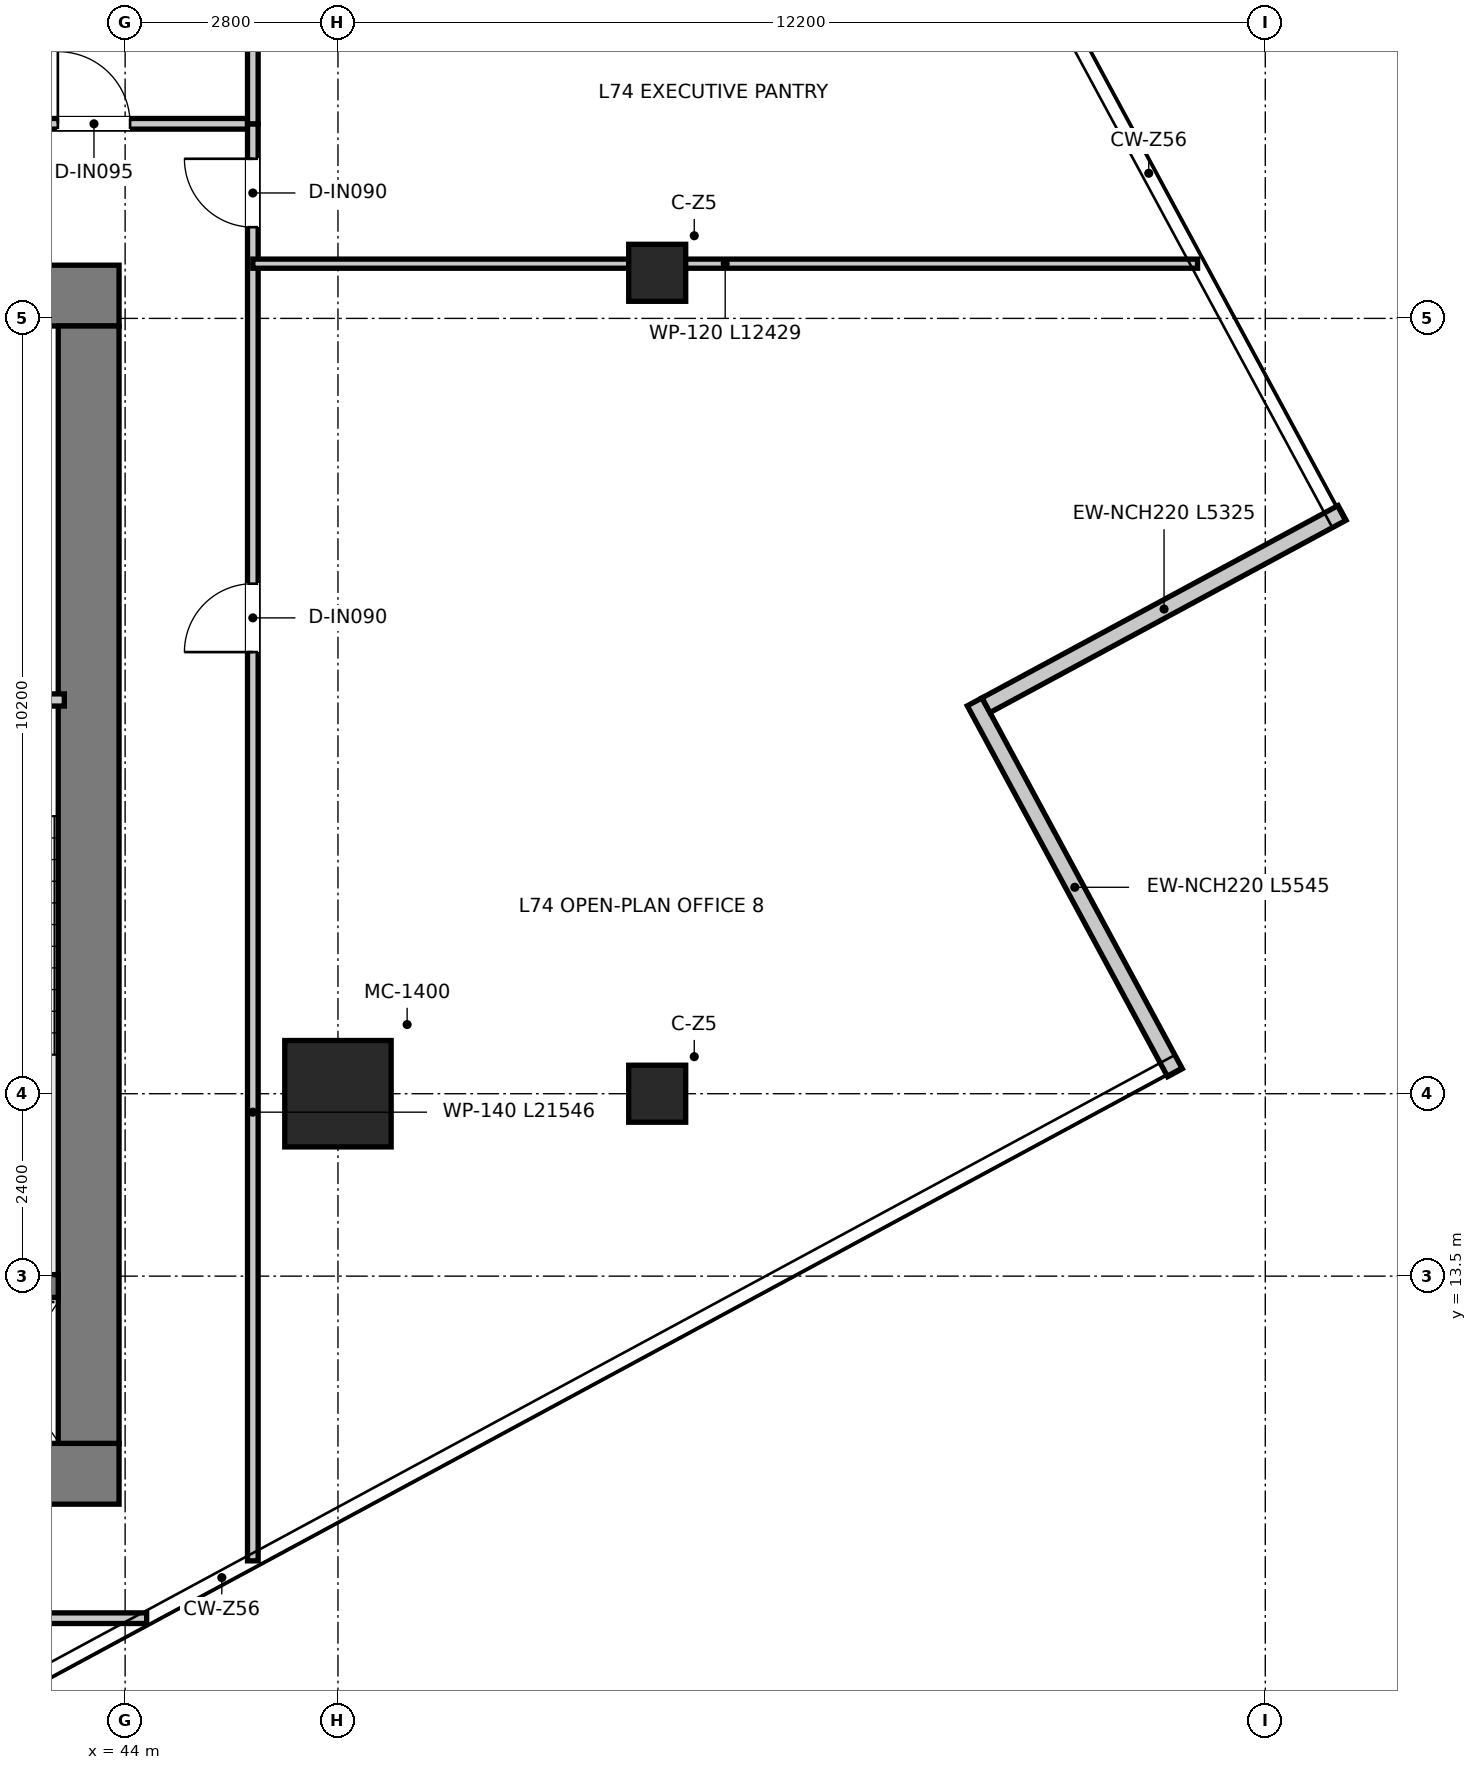
"""IFC4 building model, lengths in metres.
Left out: names, types, materials, properties, quantities, classifications, styles, units other than length and angle.
Written with IfcOpenShell. Run it as: python <this file> out.ifc"""

import sys

from ifc_helpers import new_model, si_unit, direction, frame, frame_2d, origin, origin_2d, place, context, subcontext, project, spatial, rectangle, extrude, source, transform, mapped, element, fill, save


model = new_model("IFC4")
c1 = context("Model", 3, precision=1e-05, world=origin(), true_north=direction((0.0, 1.0)))
c2 = subcontext(c1, "Body", "Model", "MODEL_VIEW")
j1 = project(units=[si_unit("LENGTHUNIT", "METRE"), si_unit("PLANEANGLEUNIT", "RADIAN")], contexts=[c1])
p1 = place(None, origin())
s1 = spatial("IfcSite", under=j1, at=p1, CompositionType="ELEMENT")
p2 = place(p1, origin())
s2 = spatial("IfcBuilding", under=s1, at=p2, CompositionType="ELEMENT")
p3 = place(p2, frame((0.0, 0.0, 302.95)))
s3 = spatial("IfcBuildingStorey", under=s2, at=p3, CompositionType="ELEMENT", Elevation=302.95)
p4 = place(p3, frame((28.08, 10.9, 0.0), z_axis=(0.0, 0.0, 1.0), x_axis=(1.0, 0.0, 0.0)))
e1 = element("IfcWall", 1, at=p4, inside=s3, PredefinedType="SHEAR", context=c2, shape_type="SweptSolid", body=[
    extrude(rectangle(XDim=15.84, YDim=0.8, at=frame_2d((7.92, 0.0))), origin(), (0.0, 0.0, 1.0), 3.95),
])
p5 = place(p3, frame((28.08, 26.4, 0.0), z_axis=(0.0, 0.0, 1.0), x_axis=(1.0, 0.0, 0.0)))
e2 = element("IfcWall", 2, at=p5, inside=s3, PredefinedType="SHEAR", context=c2, shape_type="SweptSolid", body=[
    extrude(rectangle(XDim=15.84, YDim=0.8, at=frame_2d((7.92, 0.0))), origin(), (0.0, 0.0, 1.0), 3.95),
])
p6 = place(p5, frame((7.22, 0.0, 0.0)))
e3 = element("IfcOpeningElement", 3, at=p6, cuts=e2, PredefinedType="OPENING", context=c2, shape_type="SweptSolid", body=[
    extrude(rectangle(XDim=1.4, YDim=2.2, at=frame_2d((0.7, 1.1))), frame((0.0, 0.41, 0.0), z_axis=(0.0, -1.0, 0.0), x_axis=(1.0, 0.0, 0.0)), (0.0, 0.0, 1.0), 0.82),
])
p7 = place(p5, frame((1.775, 0.0, 0.0)))
e4 = element("IfcOpeningElement", 4, at=p7, cuts=e2, PredefinedType="OPENING", context=c2, shape_type="SweptSolid", body=[
    extrude(rectangle(XDim=1.05, YDim=2.1, at=frame_2d((0.525, 1.05))), frame((0.0, 0.41, 0.0), z_axis=(0.0, -1.0, 0.0), x_axis=(1.0, 0.0, 0.0)), (0.0, 0.0, 1.0), 0.82),
])
p8 = place(p5, frame((13.015, 0.0, 0.0)))
e5 = element("IfcOpeningElement", 5, at=p8, cuts=e2, PredefinedType="OPENING", context=c2, shape_type="SweptSolid", body=[
    extrude(rectangle(XDim=1.05, YDim=2.1, at=frame_2d((0.525, 1.05))), frame((0.0, 0.41, 0.0), z_axis=(0.0, -1.0, 0.0), x_axis=(1.0, 0.0, 0.0)), (0.0, 0.0, 1.0), 0.82),
])
p9 = place(p3, frame((43.52, 11.3, 0.0), z_axis=(0.0, 0.0, 1.0), x_axis=(0.0, 1.0, 0.0)))
e6 = element("IfcWall", 6, at=p9, inside=s3, PredefinedType="SHEAR", context=c2, shape_type="SweptSolid", body=[
    extrude(rectangle(XDim=14.7, YDim=0.8, at=frame_2d((7.35, 0.0))), origin(), (0.0, 0.0, 1.0), 3.95),
])
p10 = place(p3, frame((40.02, 13.37, 0.0), z_axis=(0.0, 0.0, 1.0), x_axis=(1.0, 0.0, 0.0)))
e7 = element("IfcWall", 7, at=p10, inside=s3, PredefinedType="SHEAR", context=c2, shape_type="SweptSolid", body=[
    extrude(rectangle(XDim=3.1, YDim=0.3, at=frame_2d((1.55, 0.0))), origin(), (0.0, 0.0, 1.0), 3.95),
])
m1 = source(origin(), c2, "Body", "SweptSolid", [
    extrude(rectangle(XDim=1.4, YDim=1.4, at=origin_2d()), origin(), (0.0, 0.0, 1.0), 3.95),
])
p11 = place(p3, frame((46.8, 15.9, 0.0), z_axis=(0.0, 0.0, 1.0), x_axis=(1.0, 0.0, 0.0)))
e8 = element("IfcColumn", 8, at=p11, inside=s3, PredefinedType="USERDEFINED", context=c2, shape_type="MappedRepresentation", body=[
    mapped(m1, transform((0.0, 0.0, 0.0), x_axis=(1.0, 0.0, 0.0), y_axis=(0.0, 1.0, 0.0), z_axis=(0.0, 0.0, 1.0), scale=1.0)),
])
m2 = source(origin(), c2, "Body", "SweptSolid", [
    extrude(rectangle(XDim=0.75, YDim=0.75, at=origin_2d()), origin(), (0.0, 0.0, 1.0), 3.95),
])
for number, where, z_axis, x_axis in (
    (9, (51.0, 26.7, 0.0), (0.0, 0.0, 1.0), (1.0, 0.0, 0.0)),
    (10, (51.0, 15.9, 0.0), (0.0, 0.0, 1.0), (1.0, 0.0, 0.0)),
):
    element("IfcColumn", number, at=place(p3, frame(where, z_axis=z_axis, x_axis=x_axis)), inside=s3, PredefinedType="COLUMN", context=c2, shape_type="MappedRepresentation", body=[
        mapped(m2, transform((0.0, 0.0, 0.0), x_axis=(1.0, 0.0, 0.0), y_axis=(0.0, 1.0, 0.0), z_axis=(0.0, 0.0, 1.0), scale=1.0)),
    ])
p12 = place(p3, frame((57.812, 16.177, 0.0), z_axis=(0.0, 0.0, 1.0), x_axis=(-0.475257315172, 0.879846852796, 0.0)))
e11 = element("IfcWall", 11, at=p12, inside=s3, PredefinedType="ELEMENTEDWALL", context=c2, shape_type="SweptSolid", body=[
    extrude(rectangle(XDim=5.545, YDim=0.22, at=frame_2d((2.772, 0.0))), origin(), (0.0, 0.0, 1.0), 3.67),
])
p13 = place(p3, frame((55.326, 21.011, 0.0), z_axis=(0.0, 0.0, 1.0), x_axis=(0.879840215515, 0.475269602607, 0.0)))
e12 = element("IfcWall", 12, at=p13, inside=s3, PredefinedType="ELEMENTEDWALL", context=c2, shape_type="SweptSolid", body=[
    extrude(rectangle(XDim=5.325, YDim=0.22, at=frame_2d((2.663, 0.0))), origin(), (0.0, 0.0, 1.0), 3.67),
])
p14 = place(p3, frame((40.04, 21.08, 0.0), z_axis=(0.0, 0.0, 1.0), x_axis=(1.0, 0.0, 0.0)))
e13 = element("IfcWall", 13, at=p14, inside=s3, PredefinedType="PARTITIONING", context=c2, shape_type="SweptSolid", body=[
    extrude(rectangle(XDim=3.16, YDim=0.16, at=frame_2d((1.58, 0.0))), origin(), (0.0, 0.0, 1.0), 3.67),
])
p15 = place(p14, frame((1.055, 0.0, 0.0)))
e14 = element("IfcOpeningElement", 14, at=p15, cuts=e13, PredefinedType="OPENING", context=c2, shape_type="SweptSolid", body=[
    extrude(rectangle(XDim=1.05, YDim=2.1, at=frame_2d((0.525, 1.05))), frame((0.0, 0.09, 0.0), z_axis=(0.0, -1.0, 0.0), x_axis=(1.0, 0.0, 0.0)), (0.0, 0.0, 1.0), 0.18),
])
p16 = place(p3, frame((26.32, 28.66, 0.0), z_axis=(0.0, 0.0, 1.0), x_axis=(1.0, 0.0, 0.0)))
e15 = element("IfcWall", 15, at=p16, inside=s3, PredefinedType="PARTITIONING", context=c2, shape_type="SweptSolid", body=[
    extrude(rectangle(XDim=19.36, YDim=0.14, at=frame_2d((9.68, 0.0))), origin(), (0.0, 0.0, 1.0), 3.18),
])
p17 = place(p16, frame((1.615, 0.0, 0.0)))
e16 = element("IfcOpeningElement", 16, at=p17, cuts=e15, PredefinedType="OPENING", context=c2, shape_type="SweptSolid", body=[
    extrude(rectangle(XDim=0.95, YDim=2.1, at=frame_2d((0.475, 1.05))), frame((0.0, 0.08, 0.0), z_axis=(0.0, -1.0, 0.0), x_axis=(1.0, 0.0, 0.0)), (0.0, 0.0, 1.0), 0.16),
])
p18 = place(p16, frame((6.455, 0.0, 0.0)))
e17 = element("IfcOpeningElement", 17, at=p18, cuts=e15, PredefinedType="OPENING", context=c2, shape_type="SweptSolid", body=[
    extrude(rectangle(XDim=0.95, YDim=2.1, at=frame_2d((0.475, 1.05))), frame((0.0, 0.08, 0.0), z_axis=(0.0, -1.0, 0.0), x_axis=(1.0, 0.0, 0.0)), (0.0, 0.0, 1.0), 0.16),
])
p19 = place(p16, frame((11.955, 0.0, 0.0)))
e18 = element("IfcOpeningElement", 18, at=p19, cuts=e15, PredefinedType="OPENING", context=c2, shape_type="SweptSolid", body=[
    extrude(rectangle(XDim=0.95, YDim=2.1, at=frame_2d((0.475, 1.05))), frame((0.0, 0.08, 0.0), z_axis=(0.0, -1.0, 0.0), x_axis=(1.0, 0.0, 0.0)), (0.0, 0.0, 1.0), 0.16),
])
p20 = place(p16, frame((16.795, 0.0, 0.0)))
e19 = element("IfcOpeningElement", 19, at=p20, cuts=e15, PredefinedType="OPENING", context=c2, shape_type="SweptSolid", body=[
    extrude(rectangle(XDim=0.95, YDim=2.1, at=frame_2d((0.475, 1.05))), frame((0.0, 0.08, 0.0), z_axis=(0.0, -1.0, 0.0), x_axis=(1.0, 0.0, 0.0)), (0.0, 0.0, 1.0), 0.16),
])
p21 = place(p3, frame((45.68, 9.754, 0.0), z_axis=(0.0, 0.0, 1.0), x_axis=(0.0, 1.0, 0.0)))
e20 = element("IfcWall", 20, at=p21, inside=s3, PredefinedType="PARTITIONING", context=c2, shape_type="SweptSolid", body=[
    extrude(rectangle(XDim=18.906, YDim=0.14, at=frame_2d((9.453, 0.0))), origin(), (0.0, 0.0, 1.0), 3.13),
])
p22 = place(p21, frame((17.546, 0.0, 0.0)))
e21 = element("IfcOpeningElement", 21, at=p22, cuts=e20, PredefinedType="OPENING", context=c2, shape_type="SweptSolid", body=[
    extrude(rectangle(XDim=0.9, YDim=2.1, at=frame_2d((0.45, 1.05))), frame((0.0, 0.08, 0.0), z_axis=(0.0, -1.0, 0.0), x_axis=(1.0, 0.0, 0.0)), (0.0, 0.0, 1.0), 0.16),
])
p23 = place(p21, frame((11.956, 0.0, 0.0)))
e22 = element("IfcOpeningElement", 22, at=p23, cuts=e20, PredefinedType="OPENING", context=c2, shape_type="SweptSolid", body=[
    extrude(rectangle(XDim=0.9, YDim=2.1, at=frame_2d((0.45, 1.05))), frame((0.0, 0.08, 0.0), z_axis=(0.0, -1.0, 0.0), x_axis=(1.0, 0.0, 0.0)), (0.0, 0.0, 1.0), 0.16),
])
p24 = place(p3, frame((23.386, 9.0, 0.0), z_axis=(0.0, 0.0, 1.0), x_axis=(1.0, 0.0, 0.0)))
e23 = element("IfcWall", 23, at=p24, inside=s3, PredefinedType="PARTITIONING", context=c2, shape_type="SweptSolid", body=[
    extrude(rectangle(XDim=20.897, YDim=0.14, at=frame_2d((10.448, 0.0))), origin(), (0.0, 0.0, 1.0), 3.67),
])
p25 = place(p24, frame((8.189, 0.0, 0.0)))
e24 = element("IfcOpeningElement", 24, at=p25, cuts=e23, PredefinedType="OPENING", context=c2, shape_type="SweptSolid", body=[
    extrude(rectangle(XDim=0.85, YDim=2.1, at=frame_2d((0.425, 1.05))), frame((0.0, 0.08, 0.0), z_axis=(0.0, -1.0, 0.0), x_axis=(1.0, 0.0, 0.0)), (0.0, 0.0, 1.0), 0.16),
])
p26 = place(p24, frame((16.189, 0.0, 0.0)))
e25 = element("IfcOpeningElement", 25, at=p26, cuts=e23, PredefinedType="OPENING", context=c2, shape_type="SweptSolid", body=[
    extrude(rectangle(XDim=0.85, YDim=2.1, at=frame_2d((0.425, 1.05))), frame((0.0, 0.08, 0.0), z_axis=(0.0, -1.0, 0.0), x_axis=(1.0, 0.0, 0.0)), (0.0, 0.0, 1.0), 0.16),
])
p27 = place(p3, frame((45.68, 26.82, 0.0), z_axis=(0.0, 0.0, 1.0), x_axis=(1.0, 0.0, 0.0)))
e26 = element("IfcWall", 26, at=p27, inside=s3, PredefinedType="PARTITIONING", context=c2, shape_type="SweptSolid", body=[
    extrude(rectangle(XDim=12.429, YDim=0.12, at=frame_2d((6.215, 0.0))), origin(), (0.0, 0.0, 1.0), 3.13),
])
p28 = place(p3, frame((45.68, 28.66, 0.0), z_axis=(0.0, 0.0, 1.0), x_axis=(0.0, 1.0, 0.0)))
e27 = element("IfcWall", 27, at=p28, inside=s3, PredefinedType="PARTITIONING", context=c2, shape_type="SweptSolid", body=[
    extrude(rectangle(XDim=2.64, YDim=0.14, at=frame_2d((1.32, 0.0))), origin(), (0.0, 0.0, 1.0), 3.43),
])
p29 = place(p22, origin())
e28 = element("IfcDoor", 28, at=p29, inside=s3, OperationType="SINGLE_SWING_RIGHT", PredefinedType="DOOR", context=c2, shape_type="SweptSolid", body=[
    extrude(rectangle(XDim=0.9, YDim=2.1, at=frame_2d((0.45, 1.05))), frame((0.0, 0.025, 0.0), z_axis=(0.0, -1.0, 0.0), x_axis=(1.0, 0.0, 0.0)), (0.0, 0.0, 1.0), 0.05),
])
fill(e21, e28)
p30 = place(p20, origin())
e29 = element("IfcDoor", 29, at=p30, inside=s3, OperationType="SINGLE_SWING_LEFT", PredefinedType="DOOR", context=c2, shape_type="SweptSolid", body=[
    extrude(rectangle(XDim=0.95, YDim=2.1, at=frame_2d((0.475, 1.05))), frame((0.0, 0.025, 0.0), z_axis=(0.0, -1.0, 0.0), x_axis=(1.0, 0.0, 0.0)), (0.0, 0.0, 1.0), 0.05),
])
fill(e19, e29)
p31 = place(p23, origin())
e30 = element("IfcDoor", 30, at=p31, inside=s3, OperationType="SINGLE_SWING_LEFT", PredefinedType="DOOR", context=c2, shape_type="SweptSolid", body=[
    extrude(rectangle(XDim=0.9, YDim=2.1, at=frame_2d((0.45, 1.05))), frame((0.0, 0.025, 0.0), z_axis=(0.0, -1.0, 0.0), x_axis=(1.0, 0.0, 0.0)), (0.0, 0.0, 1.0), 0.05),
])
fill(e22, e30)
save(model, sys.argv[1])
